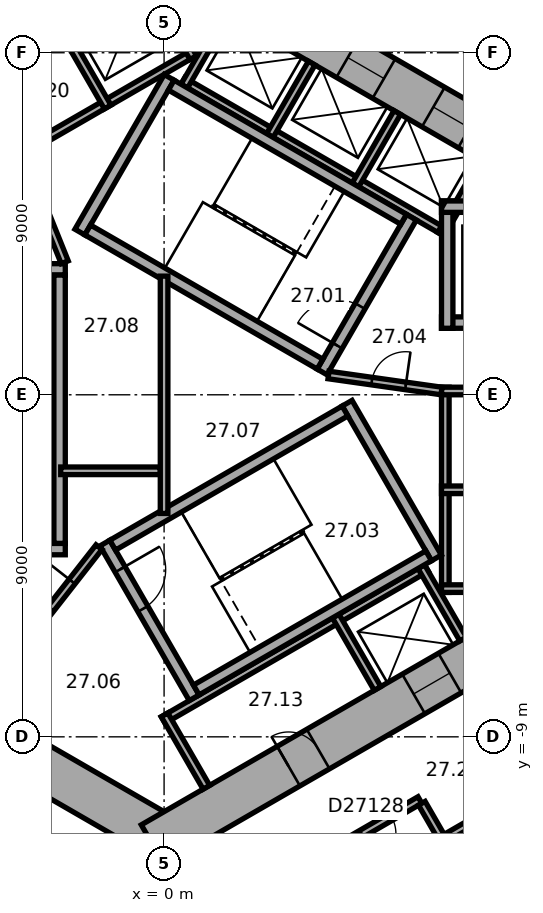
"""IFC4 building model, lengths in metres.
Left out: names, types, materials, properties, quantities, classifications, styles, units other than length and angle.
Written with IfcOpenShell. Run it as: python <this file> out.ifc"""

import sys

from ifc_helpers import new_model, si_unit, direction, frame, frame_2d, origin, place, context, subcontext, project, spatial, rectangle, extrude, element, fill, save


model = new_model("IFC4")
c1 = context("Model", 3, precision=1e-05, world=origin(), true_north=direction((0.0, 1.0)))
c2 = subcontext(c1, "Body", "Model", "MODEL_VIEW")
j1 = project(units=[si_unit("LENGTHUNIT", "METRE"), si_unit("PLANEANGLEUNIT", "RADIAN")], contexts=[c1])
p1 = place(None, origin())
s1 = spatial("IfcSite", under=j1, at=p1, CompositionType="ELEMENT")
p2 = place(p1, origin())
s2 = spatial("IfcBuilding", under=s1, at=p2, CompositionType="ELEMENT")
p3 = place(p2, frame((0.0, 0.0, 113.3)))
s3 = spatial("IfcBuildingStorey", under=s2, at=p3, CompositionType="ELEMENT", Elevation=113.3)
p4 = place(p3, frame((10.4, 5.658, 0.0), z_axis=(0.0, 0.0, 1.0), x_axis=(-0.866021384402, 0.500006961711, 0.0)))
e1 = element("IfcWall", 1, at=p4, inside=s3, PredefinedType="SHEAR", context=c2, shape_type="SweptSolid", body=[
    extrude(rectangle(XDim=12.355, YDim=1.2, at=frame_2d((6.178, 0.0))), origin(), (0.0, 0.0, 1.0), 3.3),
])
p5 = place(p4, frame((2.728, 0.0, 0.0)))
e2 = element("IfcOpeningElement", 2, at=p5, cuts=e1, PredefinedType="OPENING", context=c2, shape_type="SweptSolid", body=[
    extrude(rectangle(XDim=1.1, YDim=2.1, at=frame_2d((0.55, 1.05))), frame((0.0, 0.61, 0.0), z_axis=(0.0, -1.0, 0.0), x_axis=(1.0, 0.0, 0.0)), (0.0, 0.0, 1.0), 1.22),
])
p6 = place(p4, frame((5.328, 0.0, 0.0)))
e3 = element("IfcOpeningElement", 3, at=p6, cuts=e1, PredefinedType="OPENING", context=c2, shape_type="SweptSolid", body=[
    extrude(rectangle(XDim=1.1, YDim=2.1, at=frame_2d((0.55, 1.05))), frame((0.0, 0.61, 0.0), z_axis=(0.0, -1.0, 0.0), x_axis=(1.0, 0.0, 0.0)), (0.0, 0.0, 1.0), 1.22),
])
p7 = place(p4, frame((7.928, 0.0, 0.0)))
e4 = element("IfcOpeningElement", 4, at=p7, cuts=e1, PredefinedType="OPENING", context=c2, shape_type="SweptSolid", body=[
    extrude(rectangle(XDim=1.1, YDim=2.1, at=frame_2d((0.55, 1.05))), frame((0.0, 0.61, 0.0), z_axis=(0.0, -1.0, 0.0), x_axis=(1.0, 0.0, 0.0)), (0.0, 0.0, 1.0), 1.22),
])
p8 = place(p3, frame((0.3, 11.836, 0.0), z_axis=(0.0, 0.0, 1.0), x_axis=(-0.866021384402, -0.500006961711, 0.0)))
e5 = element("IfcWall", 5, at=p8, inside=s3, PredefinedType="SHEAR", context=c2, shape_type="SweptSolid", body=[
    extrude(rectangle(XDim=12.355, YDim=1.2, at=frame_2d((6.178, 0.0))), origin(), (0.0, 0.0, 1.0), 3.3),
])
p9 = place(p8, frame((6.378, 0.0, 0.0)))
e6 = element("IfcOpeningElement", 6, at=p9, cuts=e5, PredefinedType="OPENING", context=c2, shape_type="SweptSolid", body=[
    extrude(rectangle(XDim=1.5, YDim=2.1, at=frame_2d((0.75, 1.05))), frame((0.0, 0.61, 0.0), z_axis=(0.0, -1.0, 0.0), x_axis=(1.0, 0.0, 0.0)), (0.0, 0.0, 1.0), 1.22),
])
p10 = place(p8, frame((1.828, 0.0, 0.0)))
e7 = element("IfcOpeningElement", 7, at=p10, cuts=e5, PredefinedType="OPENING", context=c2, shape_type="SweptSolid", body=[
    extrude(rectangle(XDim=1.1, YDim=2.1, at=frame_2d((0.55, 1.05))), frame((0.0, 0.61, 0.0), z_axis=(0.0, -1.0, 0.0), x_axis=(1.0, 0.0, 0.0)), (0.0, 0.0, 1.0), 1.22),
])
p11 = place(p3, frame((-10.4, -5.658, 0.0), z_axis=(0.0, 0.0, 1.0), x_axis=(0.866021384402, -0.500006961711, 0.0)))
e8 = element("IfcWall", 8, at=p11, inside=s3, PredefinedType="SHEAR", context=c2, shape_type="SweptSolid", body=[
    extrude(rectangle(XDim=12.355, YDim=1.2, at=frame_2d((6.178, 0.0))), origin(), (0.0, 0.0, 1.0), 3.3),
])
p12 = place(p11, frame((6.378, 0.0, 0.0)))
e9 = element("IfcOpeningElement", 9, at=p12, cuts=e8, PredefinedType="OPENING", context=c2, shape_type="SweptSolid", body=[
    extrude(rectangle(XDim=1.5, YDim=2.1, at=frame_2d((0.75, 1.05))), frame((0.0, 0.61, 0.0), z_axis=(0.0, -1.0, 0.0), x_axis=(1.0, 0.0, 0.0)), (0.0, 0.0, 1.0), 1.22),
])
p13 = place(p11, frame((3.228, 0.0, 0.0)))
e10 = element("IfcOpeningElement", 10, at=p13, cuts=e8, PredefinedType="OPENING", context=c2, shape_type="SweptSolid", body=[
    extrude(rectangle(XDim=0.9, YDim=2.1, at=frame_2d((0.45, 1.05))), frame((0.0, 0.61, 0.0), z_axis=(0.0, -1.0, 0.0), x_axis=(1.0, 0.0, 0.0)), (0.0, 0.0, 1.0), 1.22),
])
p14 = place(p3, frame((-0.3, -11.836, 0.0), z_axis=(0.0, 0.0, 1.0), x_axis=(0.866021384402, 0.500006961711, 0.0)))
e11 = element("IfcWall", 11, at=p14, inside=s3, PredefinedType="SHEAR", context=c2, shape_type="SweptSolid", body=[
    extrude(rectangle(XDim=12.355, YDim=1.2, at=frame_2d((6.178, 0.0))), origin(), (0.0, 0.0, 1.0), 3.3),
])
p15 = place(p14, frame((4.128, 0.0, 0.0)))
e12 = element("IfcOpeningElement", 12, at=p15, cuts=e11, PredefinedType="OPENING", context=c2, shape_type="SweptSolid", body=[
    extrude(rectangle(XDim=0.9, YDim=2.1, at=frame_2d((0.45, 1.05))), frame((0.0, 0.61, 0.0), z_axis=(0.0, -1.0, 0.0), x_axis=(1.0, 0.0, 0.0)), (0.0, 0.0, 1.0), 1.22),
])
p16 = place(p14, frame((7.928, 0.0, 0.0)))
e13 = element("IfcOpeningElement", 13, at=p16, cuts=e11, PredefinedType="OPENING", context=c2, shape_type="SweptSolid", body=[
    extrude(rectangle(XDim=1.1, YDim=2.1, at=frame_2d((0.55, 1.05))), frame((0.0, 0.61, 0.0), z_axis=(0.0, -1.0, 0.0), x_axis=(1.0, 0.0, 0.0)), (0.0, 0.0, 1.0), 1.22),
])
p17 = place(p3, frame((7.4, -5.2, 0.0), z_axis=(0.0, 0.0, 1.0), x_axis=(0.0, 1.0, 0.0)))
e14 = element("IfcWall", 14, at=p17, inside=s3, PredefinedType="PARTITIONING", context=c2, shape_type="SweptSolid", body=[
    extrude(rectangle(XDim=5.4, YDim=0.2, at=frame_2d((2.7, 0.0))), origin(), (0.0, 0.0, 1.0), 3.05),
])
for number, where, z_axis, x_axis in (
    (15, (7.3, -5.1, 0.0), (0.0, 0.0, 1.0), (1.0, 0.0, 0.0)),
    (16, (7.3, -2.5, 0.0), (0.0, 0.0, 1.0), (1.0, 0.0, 0.0)),
    (17, (7.3, 0.1, 0.0), (0.0, 0.0, 1.0), (1.0, 0.0, 0.0)),
):
    element("IfcWall", number, at=place(p3, frame(where, z_axis=z_axis, x_axis=x_axis)), inside=s3, PredefinedType="PARTITIONING", context=c2, shape_type="SweptSolid", body=[
        extrude(rectangle(XDim=2.2, YDim=0.2, at=frame_2d((1.1, 0.0))), origin(), (0.0, 0.0, 1.0), 3.05),
    ])
p18 = place(p3, frame((7.424, 4.259, 0.0), z_axis=(0.0, 0.0, 1.0), x_axis=(-0.866026010844, 0.49999894854, 0.0)))
e18 = element("IfcWall", 18, at=p18, inside=s3, PredefinedType="PARTITIONING", context=c2, shape_type="SweptSolid", body=[
    extrude(rectangle(XDim=8.0, YDim=0.2, at=frame_2d((4.0, 0.0))), origin(), (0.0, 0.0, 1.0), 3.05),
])
for number, where, z_axis, x_axis in (
    (19, (7.287, 4.222, 0.0), (0.0, 0.0, 1.0), (0.5, 0.866, 0.0)),
    (20, (5.036, 5.522, 0.0), (0.0, 0.0, 1.0), (0.5, 0.866, 0.0)),
    (21, (2.784, 6.822, 0.0), (0.0, 0.0, 1.0), (0.5, 0.866, 0.0)),
    (22, (0.532, 8.122, 0.0), (0.0, 0.0, 1.0), (0.5, 0.866, 0.0)),
):
    element("IfcWall", number, at=place(p3, frame(where, z_axis=z_axis, x_axis=x_axis)), inside=s3, PredefinedType="PARTITIONING", context=c2, shape_type="SweptSolid", body=[
        extrude(rectangle(XDim=2.2, YDim=0.2, at=frame_2d((1.1, 0.0))), origin(), (0.0, 0.0, 1.0), 3.05),
    ])
p19 = place(p3, frame((0.803, 9.009, 0.0), z_axis=(0.0, 0.0, 1.0), x_axis=(-0.866028230842, -0.499995103361, 0.0)))
e23 = element("IfcWall", 23, at=p19, inside=s3, PredefinedType="PARTITIONING", context=c2, shape_type="SweptSolid", body=[
    extrude(rectangle(XDim=5.4, YDim=0.2, at=frame_2d((2.7, 0.0))), origin(), (0.0, 0.0, 1.0), 3.05),
])
p20 = place(p3, frame((0.767, 8.872, 0.0), z_axis=(0.0, 0.0, 1.0), x_axis=(-0.499994660107, 0.866028486751, 0.0)))
e24 = element("IfcWall", 24, at=p20, inside=s3, PredefinedType="PARTITIONING", context=c2, shape_type="SweptSolid", body=[
    extrude(rectangle(XDim=2.2, YDim=0.2, at=frame_2d((1.1, 0.0))), origin(), (0.0, 0.0, 1.0), 3.05),
])
p21 = place(p3, frame((-1.485, 7.572, 0.0), z_axis=(0.0, 0.0, 1.0), x_axis=(-0.50002983664, 0.866008176907, 0.0)))
e25 = element("IfcWall", 25, at=p21, inside=s3, PredefinedType="PARTITIONING", context=c2, shape_type="SweptSolid", body=[
    extrude(rectangle(XDim=2.2, YDim=0.2, at=frame_2d((1.1, 0.0))), origin(), (0.0, 0.0, 1.0), 3.05),
])
p22 = place(p3, frame((-0.024, -8.559, 0.0), z_axis=(0.0, 0.0, 1.0), x_axis=(0.866026010844, 0.49999894854, 0.0)))
e26 = element("IfcWall", 26, at=p22, inside=s3, PredefinedType="PARTITIONING", context=c2, shape_type="SweptSolid", body=[
    extrude(rectangle(XDim=8.0, YDim=0.2, at=frame_2d((4.0, 0.0))), origin(), (0.0, 0.0, 1.0), 3.05),
])
for number, where, z_axis, x_axis in (
    (27, (0.013, -8.422, 0.0), (0.0, 0.0, 1.0), (0.5, -0.866, 0.0)),
    (28, (4.516, -5.822, 0.0), (0.0, 0.0, 1.0), (0.5, -0.866, 0.0)),
    (29, (6.768, -4.522, 0.0), (0.0, 0.0, 1.0), (0.5, -0.866, 0.0)),
):
    element("IfcWall", number, at=place(p3, frame(where, z_axis=z_axis, x_axis=x_axis)), inside=s3, PredefinedType="PARTITIONING", context=c2, shape_type="SweptSolid", body=[
        extrude(rectangle(XDim=2.2, YDim=0.2, at=frame_2d((1.1, 0.0))), origin(), (0.0, 0.0, 1.0), 3.05),
    ])
p23 = place(p3, frame((4.158, 0.602, 0.0), z_axis=(0.0, 0.0, 1.0), x_axis=(0.499977259774, 0.866038532462, 0.0)))
e30 = element("IfcWall", 30, at=p23, inside=s3, PredefinedType="SHEAR", context=c2, shape_type="SweptSolid", body=[
    extrude(rectangle(XDim=4.7, YDim=0.3, at=frame_2d((2.35, 0.0))), origin(), (0.0, 0.0, 1.0), 3.05),
])
p24 = place(p23, frame((0.8, 0.0, 0.0)))
e31 = element("IfcOpeningElement", 31, at=p24, cuts=e30, PredefinedType="OPENING", context=c2, shape_type="SweptSolid", body=[
    extrude(rectangle(XDim=1.2, YDim=2.1, at=frame_2d((0.6, 1.05))), frame((0.0, 0.16, 0.0), z_axis=(0.0, -1.0, 0.0), x_axis=(1.0, 0.0, 0.0)), (0.0, 0.0, 1.0), 0.32),
])
p25 = place(p3, frame((-2.216, 4.282, 0.0), z_axis=(0.0, 0.0, 1.0), x_axis=(0.499977259774, 0.866038532462, 0.0)))
e32 = element("IfcWall", 32, at=p25, inside=s3, PredefinedType="SHEAR", context=c2, shape_type="SweptSolid", body=[
    extrude(rectangle(XDim=4.7, YDim=0.3, at=frame_2d((2.35, 0.0))), origin(), (0.0, 0.0, 1.0), 3.05),
])
for number, where, z_axis, x_axis in (
    (33, (4.103, 0.807, 0.0), (0.0, 0.0, 1.0), (-0.866, 0.5, 0.0)),
    (34, (6.303, 4.617, 0.0), (0.0, 0.0, 1.0), (-0.866, 0.5, 0.0)),
):
    element("IfcWall", number, at=place(p3, frame(where, z_axis=z_axis, x_axis=x_axis)), inside=s3, PredefinedType="SHEAR", context=c2, shape_type="SweptSolid", body=[
        extrude(rectangle(XDim=7.06, YDim=0.3, at=frame_2d((3.53, 0.0))), origin(), (0.0, 0.0, 1.0), 3.05),
    ])
p26 = place(p3, frame((-2.6, 3.3, 0.0), z_axis=(0.0, 0.0, 1.0), x_axis=(-1.0, 0.0, 0.0)))
e35 = element("IfcWall", 35, at=p26, inside=s3, PredefinedType="SHEAR", context=c2, shape_type="SweptSolid", body=[
    extrude(rectangle(XDim=4.7, YDim=0.3, at=frame_2d((2.35, 0.0))), origin(), (0.0, 0.0, 1.0), 3.05),
])
p27 = place(p26, frame((0.8, 0.0, 0.0)))
e36 = element("IfcOpeningElement", 36, at=p27, cuts=e35, PredefinedType="OPENING", context=c2, shape_type="SweptSolid", body=[
    extrude(rectangle(XDim=1.2, YDim=2.1, at=frame_2d((0.6, 1.05))), frame((0.0, 0.16, 0.0), z_axis=(0.0, -1.0, 0.0), x_axis=(1.0, 0.0, 0.0)), (0.0, 0.0, 1.0), 0.32),
])
p28 = place(p3, frame((-2.6, -4.06, 0.0), z_axis=(0.0, 0.0, 1.0), x_axis=(-1.0, 0.0, 0.0)))
e37 = element("IfcWall", 37, at=p28, inside=s3, PredefinedType="SHEAR", context=c2, shape_type="SweptSolid", body=[
    extrude(rectangle(XDim=4.7, YDim=0.3, at=frame_2d((2.35, 0.0))), origin(), (0.0, 0.0, 1.0), 3.05),
])
p29 = place(p3, frame((-2.75, 3.15, 0.0), z_axis=(0.0, 0.0, 1.0), x_axis=(0.0, -1.0, 0.0)))
e38 = element("IfcWall", 38, at=p29, inside=s3, PredefinedType="SHEAR", context=c2, shape_type="SweptSolid", body=[
    extrude(rectangle(XDim=7.06, YDim=0.3, at=frame_2d((3.53, 0.0))), origin(), (0.0, 0.0, 1.0), 3.05),
])
p30 = place(p3, frame((-1.558, -3.902, 0.0), z_axis=(0.0, 0.0, 1.0), x_axis=(0.499977259774, -0.866038532462, 0.0)))
e39 = element("IfcWall", 39, at=p30, inside=s3, PredefinedType="SHEAR", context=c2, shape_type="SweptSolid", body=[
    extrude(rectangle(XDim=4.7, YDim=0.3, at=frame_2d((2.35, 0.0))), origin(), (0.0, 0.0, 1.0), 3.05),
])
p31 = place(p30, frame((0.8, 0.0, 0.0)))
e40 = element("IfcOpeningElement", 40, at=p31, cuts=e39, PredefinedType="OPENING", context=c2, shape_type="SweptSolid", body=[
    extrude(rectangle(XDim=1.2, YDim=2.1, at=frame_2d((0.6, 1.05))), frame((0.0, 0.16, 0.0), z_axis=(0.0, -1.0, 0.0), x_axis=(1.0, 0.0, 0.0)), (0.0, 0.0, 1.0), 0.32),
])
p32 = place(p3, frame((4.816, -0.222, 0.0), z_axis=(0.0, 0.0, 1.0), x_axis=(0.499977259774, -0.866038532462, 0.0)))
e41 = element("IfcWall", 41, at=p32, inside=s3, PredefinedType="SHEAR", context=c2, shape_type="SweptSolid", body=[
    extrude(rectangle(XDim=4.7, YDim=0.3, at=frame_2d((2.35, 0.0))), origin(), (0.0, 0.0, 1.0), 3.05),
])
for number, where, z_axis, x_axis in (
    (42, (-1.353, -3.957, 0.0), (0.0, 0.0, 1.0), (0.866, 0.5, 0.0)),
    (43, (0.847, -7.767, 0.0), (0.0, 0.0, 1.0), (0.866, 0.5, 0.0)),
):
    element("IfcWall", number, at=place(p3, frame(where, z_axis=z_axis, x_axis=x_axis)), inside=s3, PredefinedType="SHEAR", context=c2, shape_type="SweptSolid", body=[
        extrude(rectangle(XDim=7.06, YDim=0.3, at=frame_2d((3.53, 0.0))), origin(), (0.0, 0.0, 1.0), 3.05),
    ])
p33 = place(p3, frame((7.3, 1.9, 0.0), z_axis=(0.0, 0.0, 1.0), x_axis=(1.0, 0.0, 0.0)))
e44 = element("IfcWall", 44, at=p33, inside=s3, PredefinedType="SHEAR", context=c2, shape_type="SweptSolid", body=[
    extrude(rectangle(XDim=2.2, YDim=0.3, at=frame_2d((1.1, 0.0))), origin(), (0.0, 0.0, 1.0), 3.05),
])
p34 = place(p33, frame((0.7, 0.0, 0.0)))
e45 = element("IfcOpeningElement", 45, at=p34, cuts=e44, PredefinedType="OPENING", context=c2, shape_type="SweptSolid", body=[
    extrude(rectangle(XDim=1.1, YDim=2.1, at=frame_2d((0.55, 1.05))), frame((0.0, 0.16, 0.0), z_axis=(0.0, -1.0, 0.0), x_axis=(1.0, 0.0, 0.0)), (0.0, 0.0, 1.0), 0.32),
])
p35 = place(p3, frame((7.45, 1.75, 0.0), z_axis=(0.0, 0.0, 1.0), x_axis=(0.0, 1.0, 0.0)))
e46 = element("IfcWall", 46, at=p35, inside=s3, PredefinedType="SHEAR", context=c2, shape_type="SweptSolid", body=[
    extrude(rectangle(XDim=3.35, YDim=0.3, at=frame_2d((1.675, 0.0))), origin(), (0.0, 0.0, 1.0), 3.05),
])
p36 = place(p3, frame((7.3, 4.95, 0.0), z_axis=(0.0, 0.0, 1.0), x_axis=(1.0, 0.0, 0.0)))
e47 = element("IfcWall", 47, at=p36, inside=s3, PredefinedType="SHEAR", context=c2, shape_type="SweptSolid", body=[
    extrude(rectangle(XDim=2.2, YDim=0.3, at=frame_2d((1.1, 0.0))), origin(), (0.0, 0.0, 1.0), 3.05),
])
p37 = place(p3, frame((4.327, 0.521, 0.0), z_axis=(0.0, 0.0, 1.0), x_axis=(0.990124376366, -0.14019172346, 0.0)))
e48 = element("IfcWall", 48, at=p37, inside=s3, PredefinedType="PARTITIONING", context=c2, shape_type="SweptSolid", body=[
    extrude(rectangle(XDim=3.002, YDim=0.2, at=frame_2d((1.501, 0.0))), origin(), (0.0, 0.0, 1.0), 3.05),
])
p38 = place(p37, frame((1.15, 0.0, 0.0)))
e49 = element("IfcOpeningElement", 49, at=p38, cuts=e48, PredefinedType="OPENING", context=c2, shape_type="SweptSolid", body=[
    extrude(rectangle(XDim=0.9, YDim=2.1, at=frame_2d((0.45, 1.05))), frame((0.0, 0.11, 0.0), z_axis=(0.0, -1.0, 0.0), x_axis=(1.0, 0.0, 0.0)), (0.0, 0.0, 1.0), 0.22),
])
p39 = place(p3, frame((-2.615, 3.487, 0.0), z_axis=(0.0, 0.0, 1.0), x_axis=(-0.373576831041, 0.92759924068, 0.0)))
e50 = element("IfcWall", 50, at=p39, inside=s3, PredefinedType="PARTITIONING", context=c2, shape_type="SweptSolid", body=[
    extrude(rectangle(XDim=3.002, YDim=0.2, at=frame_2d((1.501, 0.0))), origin(), (0.0, 0.0, 1.0), 3.05),
])
p40 = place(p39, frame((1.15, 0.0, 0.0)))
e51 = element("IfcOpeningElement", 51, at=p40, cuts=e50, PredefinedType="OPENING", context=c2, shape_type="SweptSolid", body=[
    extrude(rectangle(XDim=0.9, YDim=2.1, at=frame_2d((0.45, 1.05))), frame((0.0, 0.11, 0.0), z_axis=(0.0, -1.0, 0.0), x_axis=(1.0, 0.0, 0.0)), (0.0, 0.0, 1.0), 0.22),
])
p41 = place(p3, frame((-1.712, -4.008, 0.0), z_axis=(0.0, 0.0, 1.0), x_axis=(-0.616549420702, -0.787316208287, 0.0)))
e52 = element("IfcWall", 52, at=p41, inside=s3, PredefinedType="PARTITIONING", context=c2, shape_type="SweptSolid", body=[
    extrude(rectangle(XDim=3.002, YDim=0.2, at=frame_2d((1.501, 0.0))), origin(), (0.0, 0.0, 1.0), 3.05),
])
p42 = place(p41, frame((1.15, 0.0, 0.0)))
e53 = element("IfcOpeningElement", 53, at=p42, cuts=e52, PredefinedType="OPENING", context=c2, shape_type="SweptSolid", body=[
    extrude(rectangle(XDim=0.9, YDim=2.1, at=frame_2d((0.45, 1.05))), frame((0.0, 0.11, 0.0), z_axis=(0.0, -1.0, 0.0), x_axis=(1.0, 0.0, 0.0)), (0.0, 0.0, 1.0), 0.22),
])
p43 = place(p3, frame((-2.72, -2.0, 0.0), z_axis=(0.0, 0.0, 1.0), x_axis=(1.0, 0.0, 0.0)))
e54 = element("IfcWall", 54, at=p43, inside=s3, PredefinedType="PARTITIONING", context=c2, shape_type="SweptSolid", body=[
    extrude(rectangle(XDim=2.62, YDim=0.2, at=frame_2d((1.31, 0.0))), origin(), (0.0, 0.0, 1.0), 3.05),
])
p44 = place(p3, frame((0.0, -3.122, 0.0), z_axis=(0.0, 0.0, 1.0), x_axis=(0.0, 1.0, 0.0)))
e55 = element("IfcWall", 55, at=p44, inside=s3, PredefinedType="PARTITIONING", context=c2, shape_type="SweptSolid", body=[
    extrude(rectangle(XDim=6.245, YDim=0.2, at=frame_2d((3.122, 0.0))), origin(), (0.0, 0.0, 1.0), 3.05),
])
p45 = place(p3, frame((-11.615, -7.843, 0.0), z_axis=(0.0, 0.0, 1.0), x_axis=(0.866026466995, -0.499998158461, 0.0)))
e56 = element("IfcWall", 56, at=p45, inside=s3, PredefinedType="PARTITIONING", context=c2, shape_type="SweptSolid", body=[
    extrude(rectangle(XDim=12.315, YDim=0.2, at=frame_2d((6.158, 0.0))), origin(), (0.0, 0.0, 1.0), 3.05),
])
p46 = place(p45, frame((6.244, 0.0, 0.0)))
e57 = element("IfcOpeningElement", 57, at=p46, cuts=e56, PredefinedType="OPENING", context=c2, shape_type="SweptSolid", body=[
    extrude(rectangle(XDim=1.0, YDim=2.1, at=frame_2d((0.5, 1.05))), frame((0.0, 0.11, 0.0), z_axis=(0.0, -1.0, 0.0), x_axis=(1.0, 0.0, 0.0)), (0.0, 0.0, 1.0), 0.22),
])
p47 = place(p3, frame((1.033, -13.953, 0.0), z_axis=(0.0, 0.0, 1.0), x_axis=(0.866017531406, 0.500013635111, 0.0)))
e58 = element("IfcWall", 58, at=p47, inside=s3, PredefinedType="PARTITIONING", context=c2, shape_type="SweptSolid", body=[
    extrude(rectangle(XDim=6.58, YDim=0.2, at=frame_2d((3.29, 0.0))), origin(), (0.0, 0.0, 1.0), 3.05),
])
p48 = place(p47, frame((2.767, 0.0, 0.0)))
e59 = element("IfcOpeningElement", 59, at=p48, cuts=e58, PredefinedType="OPENING", context=c2, shape_type="SweptSolid", body=[
    extrude(rectangle(XDim=0.9, YDim=2.1, at=frame_2d((0.45, 1.05))), frame((0.0, 0.11, 0.0), z_axis=(0.0, -1.0, 0.0), x_axis=(1.0, 0.0, 0.0)), (0.0, 0.0, 1.0), 0.22),
])
p49 = place(p47, frame((4.811, 0.0, 0.0)))
e60 = element("IfcOpeningElement", 60, at=p49, cuts=e58, PredefinedType="OPENING", context=c2, shape_type="SweptSolid", body=[
    extrude(rectangle(XDim=0.9, YDim=2.1, at=frame_2d((0.45, 1.05))), frame((0.0, 0.11, 0.0), z_axis=(0.0, -1.0, 0.0), x_axis=(1.0, 0.0, 0.0)), (0.0, 0.0, 1.0), 0.22),
])
p50 = place(p3, frame((6.782, -10.749, 0.0), z_axis=(0.0, 0.0, 1.0), x_axis=(0.500074377092, -0.865982457891, 0.0)))
e61 = element("IfcWall", 61, at=p50, inside=s3, PredefinedType="PARTITIONING", context=c2, shape_type="SweptSolid", body=[
    extrude(rectangle(XDim=1.101, YDim=0.2, at=frame_2d((0.55, 0.0))), origin(), (0.0, 0.0, 1.0), 3.05),
])
p51 = place(p3, frame((7.419, -11.653, 0.0), z_axis=(0.0, 0.0, 1.0), x_axis=(0.866038154057, 0.49997791523, 0.0)))
e62 = element("IfcWall", 62, at=p51, inside=s3, PredefinedType="PARTITIONING", context=c2, shape_type="SweptSolid", body=[
    extrude(rectangle(XDim=3.502, YDim=0.2, at=frame_2d((1.751, 0.0))), origin(), (0.0, 0.0, 1.0), 3.05),
])
p52 = place(p24, origin())
e63 = element("IfcDoor", 63, at=p52, inside=s3, OperationType="SINGLE_SWING_RIGHT", PredefinedType="DOOR", context=c2, shape_type="SweptSolid", body=[
    extrude(rectangle(XDim=1.2, YDim=2.1, at=frame_2d((0.6, 1.05))), frame((0.0, 0.025, 0.0), z_axis=(0.0, -1.0, 0.0), x_axis=(1.0, 0.0, 0.0)), (0.0, 0.0, 1.0), 0.05),
])
fill(e31, e63)
p53 = place(p31, origin())
e64 = element("IfcDoor", 64, at=p53, inside=s3, OperationType="SINGLE_SWING_RIGHT", PredefinedType="DOOR", context=c2, shape_type="SweptSolid", body=[
    extrude(rectangle(XDim=1.2, YDim=2.1, at=frame_2d((0.6, 1.05))), frame((0.0, 0.025, 0.0), z_axis=(0.0, -1.0, 0.0), x_axis=(1.0, 0.0, 0.0)), (0.0, 0.0, 1.0), 0.05),
])
fill(e40, e64)
p54 = place(p38, origin())
e65 = element("IfcDoor", 65, at=p54, inside=s3, OperationType="SINGLE_SWING_LEFT", PredefinedType="DOOR", context=c2, shape_type="SweptSolid", body=[
    extrude(rectangle(XDim=0.9, YDim=2.1, at=frame_2d((0.45, 1.05))), frame((0.0, 0.025, 0.0), z_axis=(0.0, -1.0, 0.0), x_axis=(1.0, 0.0, 0.0)), (0.0, 0.0, 1.0), 0.05),
])
fill(e49, e65)
p55 = place(p42, origin())
e66 = element("IfcDoor", 66, at=p55, inside=s3, OperationType="SINGLE_SWING_LEFT", PredefinedType="DOOR", context=c2, shape_type="SweptSolid", body=[
    extrude(rectangle(XDim=0.9, YDim=2.1, at=frame_2d((0.45, 1.05))), frame((0.0, 0.025, 0.0), z_axis=(0.0, -1.0, 0.0), x_axis=(1.0, 0.0, 0.0)), (0.0, 0.0, 1.0), 0.05),
])
fill(e53, e66)
p56 = place(p15, origin())
e67 = element("IfcDoor", 67, at=p56, inside=s3, OperationType="SINGLE_SWING_LEFT", PredefinedType="DOOR", context=c2, shape_type="SweptSolid", body=[
    extrude(rectangle(XDim=0.9, YDim=2.1, at=frame_2d((0.45, 1.05))), frame((0.0, 0.025, 0.0), z_axis=(0.0, -1.0, 0.0), x_axis=(1.0, 0.0, 0.0)), (0.0, 0.0, 1.0), 0.05),
])
fill(e12, e67)
p57 = place(p5, origin())
e68 = element("IfcDoor", 68, at=p57, inside=s3, OperationType="DOUBLE_DOOR_SLIDING", PredefinedType="DOOR", context=c2, shape_type="SweptSolid", body=[
    extrude(rectangle(XDim=1.1, YDim=2.1, at=frame_2d((0.55, 1.05))), frame((0.0, 0.025, 0.0), z_axis=(0.0, -1.0, 0.0), x_axis=(1.0, 0.0, 0.0)), (0.0, 0.0, 1.0), 0.05),
])
fill(e2, e68)
p58 = place(p6, origin())
e69 = element("IfcDoor", 69, at=p58, inside=s3, OperationType="DOUBLE_DOOR_SLIDING", PredefinedType="DOOR", context=c2, shape_type="SweptSolid", body=[
    extrude(rectangle(XDim=1.1, YDim=2.1, at=frame_2d((0.55, 1.05))), frame((0.0, 0.025, 0.0), z_axis=(0.0, -1.0, 0.0), x_axis=(1.0, 0.0, 0.0)), (0.0, 0.0, 1.0), 0.05),
])
fill(e3, e69)
p59 = place(p16, origin())
e70 = element("IfcDoor", 70, at=p59, inside=s3, OperationType="DOUBLE_DOOR_SLIDING", PredefinedType="DOOR", context=c2, shape_type="SweptSolid", body=[
    extrude(rectangle(XDim=1.1, YDim=2.1, at=frame_2d((0.55, 1.05))), frame((0.0, 0.025, 0.0), z_axis=(0.0, -1.0, 0.0), x_axis=(1.0, 0.0, 0.0)), (0.0, 0.0, 1.0), 0.05),
])
fill(e13, e70)
p60 = place(p49, origin())
e71 = element("IfcDoor", 71, at=p60, inside=s3, OperationType="SINGLE_SWING_LEFT", PredefinedType="DOOR", context=c2, shape_type="SweptSolid", body=[
    extrude(rectangle(XDim=0.9, YDim=2.1, at=frame_2d((0.45, 1.05))), frame((0.0, 0.025, 0.0), z_axis=(0.0, -1.0, 0.0), x_axis=(1.0, 0.0, 0.0)), (0.0, 0.0, 1.0), 0.05),
])
fill(e60, e71)
save(model, sys.argv[1])
